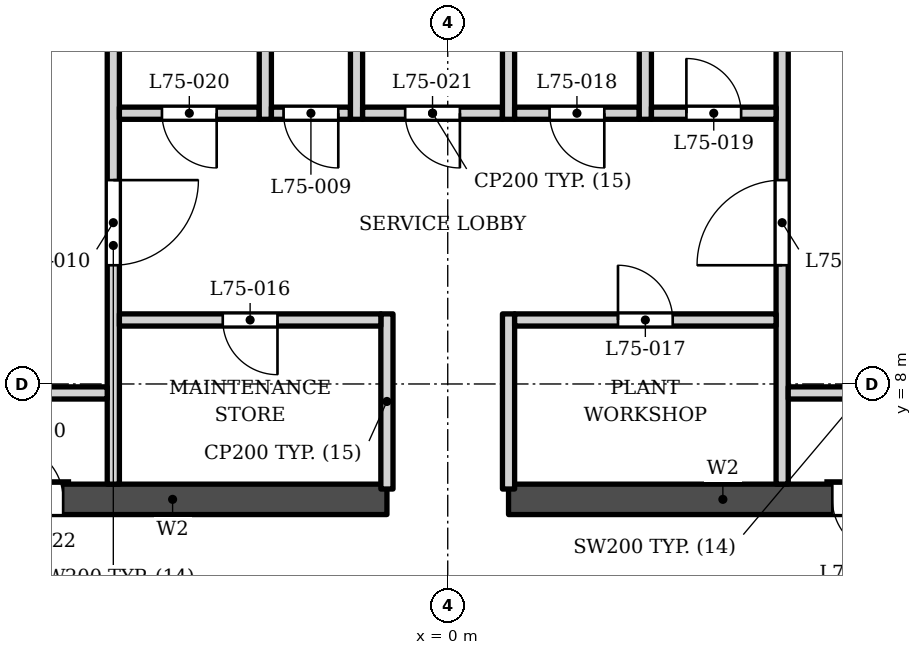
"""IFC4 building model, lengths in metres.
Left out: names, types, materials, properties, quantities, classifications, styles, units other than length and angle.
Written with IfcOpenShell. Run it as: python <this file> out.ifc"""

import sys

from ifc_helpers import new_model, si_unit, direction, frame, frame_2d, origin, place, context, subcontext, project, spatial, rectangle, extrude, element, fill, save


model = new_model("IFC4")
c1 = context("Model", 3, precision=1e-05, world=origin(), true_north=direction((0.0, 1.0)))
c2 = subcontext(c1, "Body", "Model", "MODEL_VIEW")
j1 = project(units=[si_unit("LENGTHUNIT", "METRE"), si_unit("PLANEANGLEUNIT", "RADIAN")], contexts=[c1])
p1 = place(None, origin())
s1 = spatial("IfcSite", under=j1, at=p1, CompositionType="ELEMENT")
p2 = place(p1, origin())
s2 = spatial("IfcBuilding", under=s1, at=p2, CompositionType="ELEMENT")
p3 = place(p2, frame((0.0, 0.0, 320.5)))
s3 = spatial("IfcBuildingStorey", under=s2, at=p3, CompositionType="ELEMENT", Elevation=320.5)
p4 = place(p3, frame((-8.05, 6.103, 0.0), z_axis=(0.0, 0.0, 1.0), x_axis=(1.0, 0.0, 0.0)))
e1 = element("IfcWall", 1, at=p4, inside=s3, PredefinedType="SHEAR", context=c2, shape_type="SweptSolid", body=[
    extrude(rectangle(XDim=7.05, YDim=0.5, at=frame_2d((3.525, 0.0))), origin(), (0.0, 0.0, 1.0), 5.0),
])
p5 = place(p4, frame((0.825, 0.0, 0.0)))
e2 = element("IfcOpeningElement", 2, at=p5, cuts=e1, PredefinedType="OPENING", context=c2, shape_type="SweptSolid", body=[
    extrude(rectangle(XDim=0.9, YDim=2.1, at=frame_2d((0.45, 1.05))), frame((0.0, 0.26, 0.0), z_axis=(0.0, -1.0, 0.0), x_axis=(1.0, 0.0, 0.0)), (0.0, 0.0, 1.0), 0.52),
])
p6 = place(p3, frame((1.0, 6.103, 0.0), z_axis=(0.0, 0.0, 1.0), x_axis=(1.0, 0.0, 0.0)))
e3 = element("IfcWall", 3, at=p6, inside=s3, PredefinedType="SHEAR", context=c2, shape_type="SweptSolid", body=[
    extrude(rectangle(XDim=7.05, YDim=0.5, at=frame_2d((3.525, 0.0))), origin(), (0.0, 0.0, 1.0), 5.0),
])
p7 = place(p6, frame((5.325, 0.0, 0.0)))
e4 = element("IfcOpeningElement", 4, at=p7, cuts=e3, PredefinedType="OPENING", context=c2, shape_type="SweptSolid", body=[
    extrude(rectangle(XDim=0.9, YDim=2.1, at=frame_2d((0.45, 1.05))), frame((0.0, 0.26, 0.0), z_axis=(0.0, -1.0, 0.0), x_axis=(1.0, 0.0, 0.0)), (0.0, 0.0, 1.0), 0.52),
])
for number, where, z_axis, x_axis in (
    (5, (-1.0, 6.273, 0.0), (0.0, 0.0, 1.0), (0.0, 1.0, 0.0)),
    (6, (1.0, 6.273, 0.0), (0.0, 0.0, 1.0), (0.0, 1.0, 0.0)),
):
    element("IfcWall", number, at=place(p3, frame(where, z_axis=z_axis, x_axis=x_axis)), inside=s3, PredefinedType="PARTITIONING", context=c2, shape_type="SweptSolid", body=[
        extrude(rectangle(XDim=2.88, YDim=0.2, at=frame_2d((1.44, 0.0))), origin(), (0.0, 0.0, 1.0), 4.8),
    ])
p8 = place(p3, frame((-5.5, 6.353, 0.0), z_axis=(0.0, 0.0, 1.0), x_axis=(0.0, 1.0, 0.0)))
e7 = element("IfcWall", 7, at=p8, inside=s3, PredefinedType="SOLIDWALL", context=c2, shape_type="SweptSolid", body=[
    extrude(rectangle(XDim=7.85, YDim=0.2, at=frame_2d((3.925, 0.0))), origin(), (0.0, 0.0, 1.0), 4.8),
])
p9 = place(p8, frame((3.6, 0.0, 0.0)))
e8 = element("IfcOpeningElement", 8, at=p9, cuts=e7, PredefinedType="OPENING", context=c2, shape_type="SweptSolid", body=[
    extrude(rectangle(XDim=1.4, YDim=2.1, at=frame_2d((0.7, 1.05))), frame((0.0, 0.11, 0.0), z_axis=(0.0, -1.0, 0.0), x_axis=(1.0, 0.0, 0.0)), (0.0, 0.0, 1.0), 0.22),
])
p10 = place(p3, frame((5.5, 6.353, 0.0), z_axis=(0.0, 0.0, 1.0), x_axis=(0.0, 1.0, 0.0)))
e9 = element("IfcWall", 9, at=p10, inside=s3, PredefinedType="SOLIDWALL", context=c2, shape_type="SweptSolid", body=[
    extrude(rectangle(XDim=7.85, YDim=0.2, at=frame_2d((3.925, 0.0))), origin(), (0.0, 0.0, 1.0), 4.8),
])
p11 = place(p10, frame((3.6, 0.0, 0.0)))
e10 = element("IfcOpeningElement", 10, at=p11, cuts=e9, PredefinedType="OPENING", context=c2, shape_type="SweptSolid", body=[
    extrude(rectangle(XDim=1.4, YDim=2.1, at=frame_2d((0.7, 1.05))), frame((0.0, 0.11, 0.0), z_axis=(0.0, -1.0, 0.0), x_axis=(1.0, 0.0, 0.0)), (0.0, 0.0, 1.0), 0.22),
])
for number, where, z_axis, x_axis in (
    (11, (-8.05, 7.853, 0.0), (0.0, 0.0, 1.0), (1.0, 0.0, 0.0)),
    (12, (5.6, 7.853, 0.0), (0.0, 0.0, 1.0), (1.0, 0.0, 0.0)),
):
    element("IfcWall", number, at=place(p3, frame(where, z_axis=z_axis, x_axis=x_axis)), inside=s3, PredefinedType="SOLIDWALL", context=c2, shape_type="SweptSolid", body=[
        extrude(rectangle(XDim=2.45, YDim=0.2, at=frame_2d((1.225, 0.0))), origin(), (0.0, 0.0, 1.0), 4.8),
    ])
p12 = place(p3, frame((-5.4, 9.052, 0.0), z_axis=(0.0, 0.0, 1.0), x_axis=(1.0, 0.0, 0.0)))
e13 = element("IfcWall", 13, at=p12, inside=s3, PredefinedType="PARTITIONING", context=c2, shape_type="SweptSolid", body=[
    extrude(rectangle(XDim=4.3, YDim=0.2, at=frame_2d((2.15, 0.0))), origin(), (0.0, 0.0, 1.0), 4.8),
])
p13 = place(p12, frame((1.7, 0.0, 0.0)))
e14 = element("IfcOpeningElement", 14, at=p13, cuts=e13, PredefinedType="OPENING", context=c2, shape_type="SweptSolid", body=[
    extrude(rectangle(XDim=0.9, YDim=2.1, at=frame_2d((0.45, 1.05))), frame((0.0, 0.11, 0.0), z_axis=(0.0, -1.0, 0.0), x_axis=(1.0, 0.0, 0.0)), (0.0, 0.0, 1.0), 0.22),
])
p14 = place(p3, frame((1.1, 9.052, 0.0), z_axis=(0.0, 0.0, 1.0), x_axis=(1.0, 0.0, 0.0)))
e15 = element("IfcWall", 15, at=p14, inside=s3, PredefinedType="PARTITIONING", context=c2, shape_type="SweptSolid", body=[
    extrude(rectangle(XDim=4.3, YDim=0.2, at=frame_2d((2.15, 0.0))), origin(), (0.0, 0.0, 1.0), 4.8),
])
p15 = place(p14, frame((1.7, 0.0, 0.0)))
e16 = element("IfcOpeningElement", 16, at=p15, cuts=e15, PredefinedType="OPENING", context=c2, shape_type="SweptSolid", body=[
    extrude(rectangle(XDim=0.9, YDim=2.1, at=frame_2d((0.45, 1.05))), frame((0.0, 0.11, 0.0), z_axis=(0.0, -1.0, 0.0), x_axis=(1.0, 0.0, 0.0)), (0.0, 0.0, 1.0), 0.22),
])
p16 = place(p3, frame((-5.4, 12.453, 0.0), z_axis=(0.0, 0.0, 1.0), x_axis=(1.0, 0.0, 0.0)))
e17 = element("IfcWall", 17, at=p16, inside=s3, PredefinedType="PARTITIONING", context=c2, shape_type="SweptSolid", body=[
    extrude(rectangle(XDim=2.3, YDim=0.2, at=frame_2d((1.15, 0.0))), origin(), (0.0, 0.0, 1.0), 4.8),
])
p17 = place(p16, frame((0.7, 0.0, 0.0)))
e18 = element("IfcOpeningElement", 18, at=p17, cuts=e17, PredefinedType="OPENING", context=c2, shape_type="SweptSolid", body=[
    extrude(rectangle(XDim=0.9, YDim=2.1, at=frame_2d((0.45, 1.05))), frame((0.0, 0.11, 0.0), z_axis=(0.0, -1.0, 0.0), x_axis=(1.0, 0.0, 0.0)), (0.0, 0.0, 1.0), 0.22),
])
p18 = place(p3, frame((-3.0, 12.353, 0.0), z_axis=(0.0, 0.0, 1.0), x_axis=(0.0, 1.0, 0.0)))
e19 = element("IfcWall", 19, at=p18, inside=s3, PredefinedType="PARTITIONING", context=c2, shape_type="SweptSolid", body=[
    extrude(rectangle(XDim=6.2, YDim=0.2, at=frame_2d((3.1, 0.0))), origin(), (0.0, 0.0, 1.0), 4.8),
])
p19 = place(p18, frame((3.27, 0.0, 0.0)))
e20 = element("IfcOpeningElement", 20, at=p19, cuts=e19, PredefinedType="OPENING", context=c2, shape_type="SweptSolid", body=[
    extrude(rectangle(XDim=0.9, YDim=2.1, at=frame_2d((0.45, 1.05))), frame((0.0, 0.11, 0.0), z_axis=(0.0, -1.0, 0.0), x_axis=(1.0, 0.0, 0.0)), (0.0, 0.0, 1.0), 0.22),
])
p20 = place(p18, frame((4.82, 0.0, 0.0)))
e21 = element("IfcOpeningElement", 21, at=p20, cuts=e19, PredefinedType="OPENING", context=c2, shape_type="SweptSolid", body=[
    extrude(rectangle(XDim=0.9, YDim=2.1, at=frame_2d((0.45, 1.05))), frame((0.0, 0.11, 0.0), z_axis=(0.0, -1.0, 0.0), x_axis=(1.0, 0.0, 0.0)), (0.0, 0.0, 1.0), 0.22),
])
p21 = place(p3, frame((-2.9, 12.453, 0.0), z_axis=(0.0, 0.0, 1.0), x_axis=(1.0, 0.0, 0.0)))
e22 = element("IfcWall", 22, at=p21, inside=s3, PredefinedType="PARTITIONING", context=c2, shape_type="SweptSolid", body=[
    extrude(rectangle(XDim=1.3, YDim=0.2, at=frame_2d((0.65, 0.0))), origin(), (0.0, 0.0, 1.0), 4.8),
])
p22 = place(p21, frame((0.2, 0.0, 0.0)))
e23 = element("IfcOpeningElement", 23, at=p22, cuts=e22, PredefinedType="OPENING", context=c2, shape_type="SweptSolid", body=[
    extrude(rectangle(XDim=0.9, YDim=2.1, at=frame_2d((0.45, 1.05))), frame((0.0, 0.11, 0.0), z_axis=(0.0, -1.0, 0.0), x_axis=(1.0, 0.0, 0.0)), (0.0, 0.0, 1.0), 0.22),
])
p23 = place(p3, frame((-1.5, 12.353, 0.0), z_axis=(0.0, 0.0, 1.0), x_axis=(0.0, 1.0, 0.0)))
e24 = element("IfcWall", 24, at=p23, inside=s3, PredefinedType="PARTITIONING", context=c2, shape_type="SweptSolid", body=[
    extrude(rectangle(XDim=6.2, YDim=0.2, at=frame_2d((3.1, 0.0))), origin(), (0.0, 0.0, 1.0), 4.8),
])
p24 = place(p23, frame((3.58, 0.0, 0.0)))
e25 = element("IfcOpeningElement", 25, at=p24, cuts=e24, PredefinedType="OPENING", context=c2, shape_type="SweptSolid", body=[
    extrude(rectangle(XDim=0.9, YDim=2.1, at=frame_2d((0.45, 1.05))), frame((0.0, 0.11, 0.0), z_axis=(0.0, -1.0, 0.0), x_axis=(1.0, 0.0, 0.0)), (0.0, 0.0, 1.0), 0.22),
])
p25 = place(p23, frame((5.13, 0.0, 0.0)))
e26 = element("IfcOpeningElement", 26, at=p25, cuts=e24, PredefinedType="OPENING", context=c2, shape_type="SweptSolid", body=[
    extrude(rectangle(XDim=0.9, YDim=2.1, at=frame_2d((0.45, 1.05))), frame((0.0, 0.11, 0.0), z_axis=(0.0, -1.0, 0.0), x_axis=(1.0, 0.0, 0.0)), (0.0, 0.0, 1.0), 0.22),
])
p26 = place(p3, frame((-1.4, 12.453, 0.0), z_axis=(0.0, 0.0, 1.0), x_axis=(1.0, 0.0, 0.0)))
e27 = element("IfcWall", 27, at=p26, inside=s3, PredefinedType="PARTITIONING", context=c2, shape_type="SweptSolid", body=[
    extrude(rectangle(XDim=2.3, YDim=0.2, at=frame_2d((1.15, 0.0))), origin(), (0.0, 0.0, 1.0), 4.8),
])
p27 = place(p26, frame((0.7, 0.0, 0.0)))
e28 = element("IfcOpeningElement", 28, at=p27, cuts=e27, PredefinedType="OPENING", context=c2, shape_type="SweptSolid", body=[
    extrude(rectangle(XDim=0.9, YDim=2.1, at=frame_2d((0.45, 1.05))), frame((0.0, 0.11, 0.0), z_axis=(0.0, -1.0, 0.0), x_axis=(1.0, 0.0, 0.0)), (0.0, 0.0, 1.0), 0.22),
])
p28 = place(p3, frame((1.0, 12.353, 0.0), z_axis=(0.0, 0.0, 1.0), x_axis=(0.0, 1.0, 0.0)))
e29 = element("IfcWall", 29, at=p28, inside=s3, PredefinedType="PARTITIONING", context=c2, shape_type="SweptSolid", body=[
    extrude(rectangle(XDim=3.2, YDim=0.2, at=frame_2d((1.6, 0.0))), origin(), (0.0, 0.0, 1.0), 4.8),
])
p29 = place(p3, frame((1.1, 12.453, 0.0), z_axis=(0.0, 0.0, 1.0), x_axis=(1.0, 0.0, 0.0)))
e30 = element("IfcWall", 30, at=p29, inside=s3, PredefinedType="PARTITIONING", context=c2, shape_type="SweptSolid", body=[
    extrude(rectangle(XDim=2.05, YDim=0.2, at=frame_2d((1.025, 0.0))), origin(), (0.0, 0.0, 1.0), 4.8),
])
p30 = place(p29, frame((0.575, 0.0, 0.0)))
e31 = element("IfcOpeningElement", 31, at=p30, cuts=e30, PredefinedType="OPENING", context=c2, shape_type="SweptSolid", body=[
    extrude(rectangle(XDim=0.9, YDim=2.1, at=frame_2d((0.45, 1.05))), frame((0.0, 0.11, 0.0), z_axis=(0.0, -1.0, 0.0), x_axis=(1.0, 0.0, 0.0)), (0.0, 0.0, 1.0), 0.22),
])
p31 = place(p3, frame((3.25, 12.353, 0.0), z_axis=(0.0, 0.0, 1.0), x_axis=(0.0, 1.0, 0.0)))
e32 = element("IfcWall", 32, at=p31, inside=s3, PredefinedType="PARTITIONING", context=c2, shape_type="SweptSolid", body=[
    extrude(rectangle(XDim=3.2, YDim=0.2, at=frame_2d((1.6, 0.0))), origin(), (0.0, 0.0, 1.0), 4.8),
])
p32 = place(p3, frame((3.35, 12.453, 0.0), z_axis=(0.0, 0.0, 1.0), x_axis=(1.0, 0.0, 0.0)))
e33 = element("IfcWall", 33, at=p32, inside=s3, PredefinedType="PARTITIONING", context=c2, shape_type="SweptSolid", body=[
    extrude(rectangle(XDim=2.05, YDim=0.2, at=frame_2d((1.025, 0.0))), origin(), (0.0, 0.0, 1.0), 4.8),
])
p33 = place(p32, frame((0.575, 0.0, 0.0)))
e34 = element("IfcOpeningElement", 34, at=p33, cuts=e33, PredefinedType="OPENING", context=c2, shape_type="SweptSolid", body=[
    extrude(rectangle(XDim=0.9, YDim=2.1, at=frame_2d((0.45, 1.05))), frame((0.0, 0.11, 0.0), z_axis=(0.0, -1.0, 0.0), x_axis=(1.0, 0.0, 0.0)), (0.0, 0.0, 1.0), 0.22),
])
p34 = place(p22, origin())
e35 = element("IfcDoor", 35, at=p34, inside=s3, OperationType="SINGLE_SWING_RIGHT", PredefinedType="DOOR", context=c2, shape_type="SweptSolid", body=[
    extrude(rectangle(XDim=0.9, YDim=2.1, at=frame_2d((0.45, 1.05))), frame((0.0, 0.025, 0.0), z_axis=(0.0, -1.0, 0.0), x_axis=(1.0, 0.0, 0.0)), (0.0, 0.0, 1.0), 0.05),
])
fill(e23, e35)
p35 = place(p9, origin())
e36 = element("IfcDoor", 36, at=p35, inside=s3, OperationType="SINGLE_SWING_RIGHT", PredefinedType="DOOR", context=c2, shape_type="SweptSolid", body=[
    extrude(rectangle(XDim=1.4, YDim=2.1, at=frame_2d((0.7, 1.05))), frame((0.0, 0.025, 0.0), z_axis=(0.0, -1.0, 0.0), x_axis=(1.0, 0.0, 0.0)), (0.0, 0.0, 1.0), 0.05),
])
fill(e8, e36)
p36 = place(p11, origin())
e37 = element("IfcDoor", 37, at=p36, inside=s3, OperationType="SINGLE_SWING_LEFT", PredefinedType="DOOR", context=c2, shape_type="SweptSolid", body=[
    extrude(rectangle(XDim=1.4, YDim=2.1, at=frame_2d((0.7, 1.05))), frame((0.0, 0.025, 0.0), z_axis=(0.0, -1.0, 0.0), x_axis=(1.0, 0.0, 0.0)), (0.0, 0.0, 1.0), 0.05),
])
fill(e10, e37)
p37 = place(p13, origin())
e38 = element("IfcDoor", 38, at=p37, inside=s3, OperationType="SINGLE_SWING_RIGHT", PredefinedType="DOOR", context=c2, shape_type="SweptSolid", body=[
    extrude(rectangle(XDim=0.9, YDim=2.1, at=frame_2d((0.45, 1.05))), frame((0.0, 0.025, 0.0), z_axis=(0.0, -1.0, 0.0), x_axis=(1.0, 0.0, 0.0)), (0.0, 0.0, 1.0), 0.05),
])
fill(e14, e38)
p38 = place(p15, origin())
e39 = element("IfcDoor", 39, at=p38, inside=s3, OperationType="SINGLE_SWING_LEFT", PredefinedType="DOOR", context=c2, shape_type="SweptSolid", body=[
    extrude(rectangle(XDim=0.9, YDim=2.1, at=frame_2d((0.45, 1.05))), frame((0.0, 0.025, 0.0), z_axis=(0.0, -1.0, 0.0), x_axis=(1.0, 0.0, 0.0)), (0.0, 0.0, 1.0), 0.05),
])
fill(e16, e39)
p39 = place(p30, origin())
e40 = element("IfcDoor", 40, at=p39, inside=s3, OperationType="SINGLE_SWING_RIGHT", PredefinedType="DOOR", context=c2, shape_type="SweptSolid", body=[
    extrude(rectangle(XDim=0.9, YDim=2.1, at=frame_2d((0.45, 1.05))), frame((0.0, 0.025, 0.0), z_axis=(0.0, -1.0, 0.0), x_axis=(1.0, 0.0, 0.0)), (0.0, 0.0, 1.0), 0.05),
])
fill(e31, e40)
p40 = place(p33, origin())
e41 = element("IfcDoor", 41, at=p40, inside=s3, OperationType="SINGLE_SWING_LEFT", PredefinedType="DOOR", context=c2, shape_type="SweptSolid", body=[
    extrude(rectangle(XDim=0.9, YDim=2.1, at=frame_2d((0.45, 1.05))), frame((0.0, 0.025, 0.0), z_axis=(0.0, -1.0, 0.0), x_axis=(1.0, 0.0, 0.0)), (0.0, 0.0, 1.0), 0.05),
])
fill(e34, e41)
p41 = place(p17, origin())
e42 = element("IfcDoor", 42, at=p41, inside=s3, OperationType="SINGLE_SWING_RIGHT", PredefinedType="DOOR", context=c2, shape_type="SweptSolid", body=[
    extrude(rectangle(XDim=0.9, YDim=2.1, at=frame_2d((0.45, 1.05))), frame((0.0, 0.025, 0.0), z_axis=(0.0, -1.0, 0.0), x_axis=(1.0, 0.0, 0.0)), (0.0, 0.0, 1.0), 0.05),
])
fill(e18, e42)
p42 = place(p27, origin())
e43 = element("IfcDoor", 43, at=p42, inside=s3, OperationType="SINGLE_SWING_RIGHT", PredefinedType="DOOR", context=c2, shape_type="SweptSolid", body=[
    extrude(rectangle(XDim=0.9, YDim=2.1, at=frame_2d((0.45, 1.05))), frame((0.0, 0.025, 0.0), z_axis=(0.0, -1.0, 0.0), x_axis=(1.0, 0.0, 0.0)), (0.0, 0.0, 1.0), 0.05),
])
fill(e28, e43)
p43 = place(p5, origin())
e44 = element("IfcDoor", 44, at=p43, inside=s3, OperationType="SINGLE_SWING_LEFT", PredefinedType="DOOR", context=c2, shape_type="SweptSolid", body=[
    extrude(rectangle(XDim=0.9, YDim=2.1, at=frame_2d((0.45, 1.05))), frame((0.0, 0.025, 0.0), z_axis=(0.0, -1.0, 0.0), x_axis=(1.0, 0.0, 0.0)), (0.0, 0.0, 1.0), 0.05),
])
fill(e2, e44)
p44 = place(p7, origin())
e45 = element("IfcDoor", 45, at=p44, inside=s3, OperationType="SINGLE_SWING_RIGHT", PredefinedType="DOOR", context=c2, shape_type="SweptSolid", body=[
    extrude(rectangle(XDim=0.9, YDim=2.1, at=frame_2d((0.45, 1.05))), frame((0.0, 0.025, 0.0), z_axis=(0.0, -1.0, 0.0), x_axis=(1.0, 0.0, 0.0)), (0.0, 0.0, 1.0), 0.05),
])
fill(e4, e45)
save(model, sys.argv[1])
